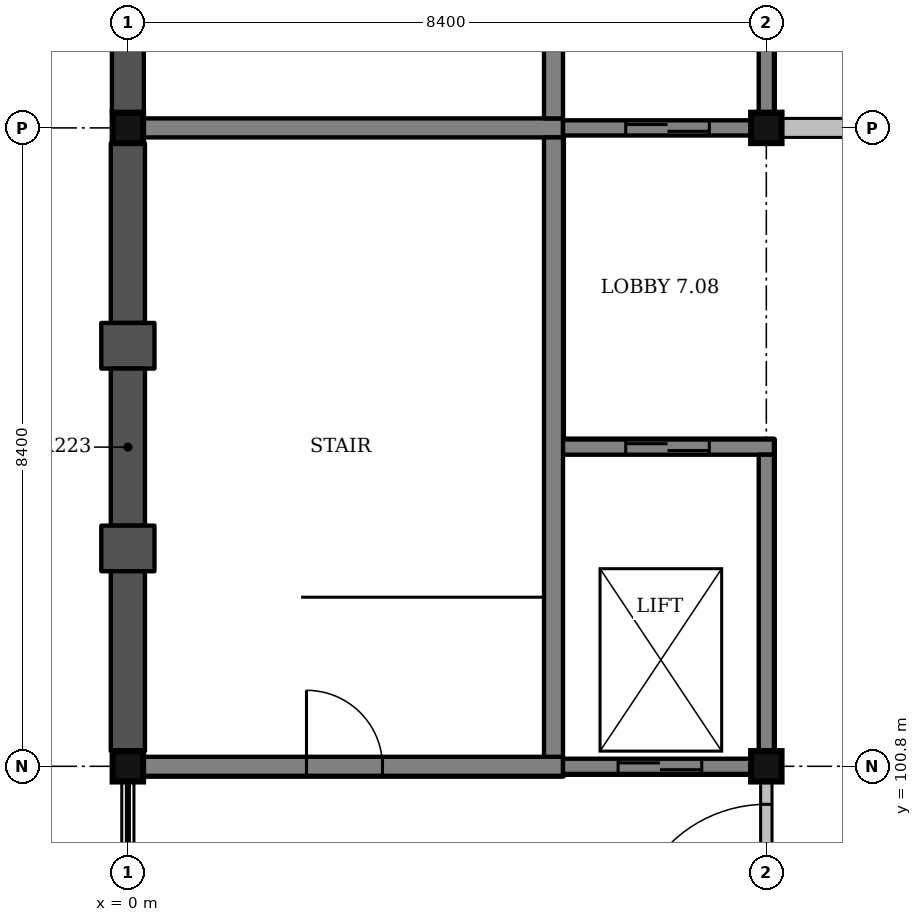
"""IFC4 building model, lengths in metres.
Left out: names, types, materials, properties, quantities, classifications, styles, units other than length and angle.
Written with IfcOpenShell. Run it as: python <this file> out.ifc"""

import sys

from ifc_helpers import new_model, si_unit, direction, frame, frame_2d, origin, origin_2d, place, context, subcontext, project, spatial, rectangle, extrude, element, fill, save


model = new_model("IFC4")
c1 = context("Model", 3, precision=1e-05, world=origin(), true_north=direction((0.0, 1.0)))
c2 = subcontext(c1, "Body", "Model", "MODEL_VIEW")
j1 = project(units=[si_unit("LENGTHUNIT", "METRE"), si_unit("PLANEANGLEUNIT", "RADIAN")], contexts=[c1])
p1 = place(None, origin())
s1 = spatial("IfcSite", under=j1, at=p1, CompositionType="ELEMENT")
p2 = place(p1, origin())
s2 = spatial("IfcBuilding", under=s1, at=p2, CompositionType="ELEMENT")
p3 = place(p2, frame((0.0, 0.0, 31.5)))
s3 = spatial("IfcBuildingStorey", under=s2, at=p3, CompositionType="ELEMENT", Elevation=31.5)
for number, where, z_axis, x_axis in (
    (1, (0.0, 100.8, 0.0), (0.0, 0.0, 1.0), (1.0, 0.0, 0.0)),
    (2, (0.0, 109.2, 0.0), (0.0, 0.0, 1.0), (1.0, 0.0, 0.0)),
    (3, (8.4, 100.8, 0.0), (0.0, 0.0, 1.0), (1.0, 0.0, 0.0)),
    (4, (8.4, 109.2, 0.0), (0.0, 0.0, 1.0), (1.0, 0.0, 0.0)),
):
    element("IfcColumn", number, at=place(p3, frame(where, z_axis=z_axis, x_axis=x_axis)), inside=s3, PredefinedType="COLUMN", context=c2, shape_type="SweptSolid", body=[
        extrude(rectangle(XDim=0.4, YDim=0.4, at=origin_2d()), origin(), (0.0, 0.0, 1.0), 4.5),
    ])
p4 = place(p3, frame((5.5, 105.0, 0.0), z_axis=(0.0, 0.0, 1.0), x_axis=(1.0, 0.0, 0.0)))
e5 = element("IfcWall", 5, at=p4, inside=s3, PredefinedType="SHEAR", context=c2, shape_type="SweptSolid", body=[
    extrude(rectangle(XDim=3.0, YDim=0.2, at=frame_2d((1.5, 0.0))), origin(), (0.0, 0.0, 1.0), 4.5),
])
p5 = place(p4, frame((1.05, 0.0, 0.0)))
e6 = element("IfcOpeningElement", 6, at=p5, cuts=e5, PredefinedType="OPENING", context=c2, shape_type="SweptSolid", body=[
    extrude(rectangle(XDim=1.1, YDim=2.1, at=frame_2d((0.55, 1.05))), frame((0.0, 0.11, 0.0), z_axis=(0.0, -1.0, 0.0), x_axis=(1.0, 0.0, 0.0)), (0.0, 0.0, 1.0), 0.22),
])
p6 = place(p3, frame((8.4, 101.0, 0.0), z_axis=(0.0, 0.0, 1.0), x_axis=(0.0, 1.0, 0.0)))
e7 = element("IfcWall", 7, at=p6, inside=s3, PredefinedType="SHEAR", context=c2, shape_type="SweptSolid", body=[
    extrude(rectangle(XDim=3.9, YDim=0.2, at=frame_2d((1.95, 0.0))), origin(), (0.0, 0.0, 1.0), 4.5),
])
p7 = place(p3, frame((8.4, 109.4, 0.0), z_axis=(0.0, 0.0, 1.0), x_axis=(0.0, 1.0, 0.0)))
e8 = element("IfcWall", 8, at=p7, inside=s3, PredefinedType="SHEAR", context=c2, shape_type="SweptSolid", body=[
    extrude(rectangle(XDim=3.9, YDim=0.2, at=frame_2d((1.95, 0.0))), origin(), (0.0, 0.0, 1.0), 4.5),
])
p8 = place(p3, frame((0.2, 100.8, 0.0), z_axis=(0.0, 0.0, 1.0), x_axis=(1.0, 0.0, 0.0)))
e9 = element("IfcWall", 9, at=p8, inside=s3, PredefinedType="SHEAR", context=c2, shape_type="SweptSolid", body=[
    extrude(rectangle(XDim=5.525, YDim=0.25, at=frame_2d((2.763, 0.0))), origin(), (0.0, 0.0, 1.0), 4.2),
])
p9 = place(p8, frame((2.15, 0.0, 0.0)))
e10 = element("IfcOpeningElement", 10, at=p9, cuts=e9, PredefinedType="OPENING", context=c2, shape_type="SweptSolid", body=[
    extrude(rectangle(XDim=1.0, YDim=2.1, at=frame_2d((0.5, 1.05))), frame((0.0, 0.135, 0.0), z_axis=(0.0, -1.0, 0.0), x_axis=(1.0, 0.0, 0.0)), (0.0, 0.0, 1.0), 0.27),
])
p10 = place(p3, frame((0.2, 109.2, 0.0), z_axis=(0.0, 0.0, 1.0), x_axis=(1.0, 0.0, 0.0)))
e11 = element("IfcWall", 11, at=p10, inside=s3, PredefinedType="SHEAR", context=c2, shape_type="SweptSolid", body=[
    extrude(rectangle(XDim=5.525, YDim=0.25, at=frame_2d((2.763, 0.0))), origin(), (0.0, 0.0, 1.0), 4.2),
])
p11 = place(p3, frame((5.6, 100.925, 0.0), z_axis=(0.0, 0.0, 1.0), x_axis=(0.0, 1.0, 0.0)))
e12 = element("IfcWall", 12, at=p11, inside=s3, PredefinedType="SHEAR", context=c2, shape_type="SweptSolid", body=[
    extrude(rectangle(XDim=8.15, YDim=0.25, at=frame_2d((4.075, 0.0))), origin(), (0.0, 0.0, 1.0), 4.2),
])
p12 = place(p3, frame((5.6, 109.325, 0.0), z_axis=(0.0, 0.0, 1.0), x_axis=(0.0, 1.0, 0.0)))
e13 = element("IfcWall", 13, at=p12, inside=s3, PredefinedType="SHEAR", context=c2, shape_type="SweptSolid", body=[
    extrude(rectangle(XDim=8.15, YDim=0.25, at=frame_2d((4.075, 0.0))), origin(), (0.0, 0.0, 1.0), 4.2),
])
p13 = place(p3, frame((0.0, 109.0, 0.0), z_axis=(0.0, 0.0, 1.0), x_axis=(0.0, -1.0, 0.0)))
e14 = element("IfcWall", 14, at=p13, inside=s3, PredefinedType="SOLIDWALL", context=c2, shape_type="SweptSolid", body=[
    extrude(rectangle(XDim=2.367, YDim=0.45, at=frame_2d((1.183, 0.0))), origin(), (0.0, 0.0, 1.0), 4.2),
])
p14 = place(p3, frame((0.0, 106.633, 0.0), z_axis=(0.0, 0.0, 1.0), x_axis=(0.0, -1.0, 0.0)))
e15 = element("IfcWall", 15, at=p14, inside=s3, PredefinedType="SOLIDWALL", context=c2, shape_type="SweptSolid", body=[
    extrude(rectangle(XDim=0.6, YDim=0.7, at=frame_2d((0.3, 0.0))), origin(), (0.0, 0.0, 1.0), 4.2),
])
p15 = place(p3, frame((0.0, 106.033, 0.0), z_axis=(0.0, 0.0, 1.0), x_axis=(0.0, -1.0, 0.0)))
e16 = element("IfcWall", 16, at=p15, inside=s3, PredefinedType="SOLIDWALL", context=c2, shape_type="SweptSolid", body=[
    extrude(rectangle(XDim=2.066, YDim=0.45, at=frame_2d((1.033, 0.0))), origin(), (0.0, 0.0, 1.0), 4.2),
])
p16 = place(p3, frame((0.0, 103.967, 0.0), z_axis=(0.0, 0.0, 1.0), x_axis=(0.0, -1.0, 0.0)))
e17 = element("IfcWall", 17, at=p16, inside=s3, PredefinedType="SOLIDWALL", context=c2, shape_type="SweptSolid", body=[
    extrude(rectangle(XDim=0.6, YDim=0.7, at=frame_2d((0.3, 0.0))), origin(), (0.0, 0.0, 1.0), 4.2),
])
p17 = place(p3, frame((0.0, 103.367, 0.0), z_axis=(0.0, 0.0, 1.0), x_axis=(0.0, -1.0, 0.0)))
e18 = element("IfcWall", 18, at=p17, inside=s3, PredefinedType="SOLIDWALL", context=c2, shape_type="SweptSolid", body=[
    extrude(rectangle(XDim=2.367, YDim=0.45, at=frame_2d((1.183, 0.0))), origin(), (0.0, 0.0, 1.0), 4.2),
])
p18 = place(p3, frame((0.0, 113.1, 0.0), z_axis=(0.0, 0.0, 1.0), x_axis=(0.0, -1.0, 0.0)))
e19 = element("IfcWall", 19, at=p18, inside=s3, PredefinedType="SOLIDWALL", context=c2, shape_type="SweptSolid", body=[
    extrude(rectangle(XDim=3.7, YDim=0.42, at=frame_2d((1.85, 0.0))), origin(), (0.0, 0.0, 1.0), 4.2),
])
p19 = place(p3, frame((8.6, 109.2, 0.0), z_axis=(0.0, 0.0, 1.0), x_axis=(1.0, 0.0, 0.0)))
e20 = element("IfcWall", 20, at=p19, inside=s3, PredefinedType="SOLIDWALL", context=c2, shape_type="SweptSolid", body=[
    extrude(rectangle(XDim=8.0, YDim=0.25, at=frame_2d((4.0, 0.0))), origin(), (0.0, 0.0, 1.0), 4.15),
])
p20 = place(p3, frame((8.4, 92.6, 0.0), z_axis=(0.0, 0.0, 1.0), x_axis=(0.0, 1.0, 0.0)))
e21 = element("IfcWall", 21, at=p20, inside=s3, PredefinedType="PARTITIONING", context=c2, shape_type="SweptSolid", body=[
    extrude(rectangle(XDim=8.0, YDim=0.15, at=frame_2d((4.0, 0.0))), origin(), (0.0, 0.0, 1.0), 3.6),
])
p21 = place(p20, frame((5.9, 0.0, 0.0)))
e22 = element("IfcOpeningElement", 22, at=p21, cuts=e21, PredefinedType="OPENING", context=c2, shape_type="SweptSolid", body=[
    extrude(rectangle(XDim=1.8, YDim=2.1, at=frame_2d((0.9, 1.05))), frame((0.0, 0.085, 0.0), z_axis=(0.0, -1.0, 0.0), x_axis=(1.0, 0.0, 0.0)), (0.0, 0.0, 1.0), 0.17),
])
p22 = place(p3, frame((5.725, 100.8, 0.0), z_axis=(0.0, 0.0, 1.0), x_axis=(1.0, 0.0, 0.0)))
e23 = element("IfcWall", 23, at=p22, inside=s3, PredefinedType="SHEAR", context=c2, shape_type="SweptSolid", body=[
    extrude(rectangle(XDim=2.475, YDim=0.2, at=frame_2d((1.237, 0.0))), origin(), (0.0, 0.0, 1.0), 4.5),
])
p23 = place(p22, frame((0.725, 0.0, 0.0)))
e24 = element("IfcOpeningElement", 24, at=p23, cuts=e23, PredefinedType="OPENING", context=c2, shape_type="SweptSolid", body=[
    extrude(rectangle(XDim=1.1, YDim=2.1, at=frame_2d((0.55, 1.05))), frame((0.0, 0.11, 0.0), z_axis=(0.0, -1.0, 0.0), x_axis=(1.0, 0.0, 0.0)), (0.0, 0.0, 1.0), 0.22),
])
p24 = place(p3, frame((5.725, 109.2, 0.0), z_axis=(0.0, 0.0, 1.0), x_axis=(1.0, 0.0, 0.0)))
e25 = element("IfcWall", 25, at=p24, inside=s3, PredefinedType="SHEAR", context=c2, shape_type="SweptSolid", body=[
    extrude(rectangle(XDim=2.475, YDim=0.2, at=frame_2d((1.237, 0.0))), origin(), (0.0, 0.0, 1.0), 4.5),
])
p25 = place(p24, frame((0.825, 0.0, 0.0)))
e26 = element("IfcOpeningElement", 26, at=p25, cuts=e25, PredefinedType="OPENING", context=c2, shape_type="SweptSolid", body=[
    extrude(rectangle(XDim=1.1, YDim=2.1, at=frame_2d((0.55, 1.05))), frame((0.0, 0.11, 0.0), z_axis=(0.0, -1.0, 0.0), x_axis=(1.0, 0.0, 0.0)), (0.0, 0.0, 1.0), 0.22),
])
p26 = place(p21, origin())
e27 = element("IfcDoor", 27, at=p26, inside=s3, OperationType="DOUBLE_DOOR_SINGLE_SWING", PredefinedType="DOOR", context=c2, shape_type="SweptSolid", body=[
    extrude(rectangle(XDim=1.8, YDim=2.1, at=frame_2d((0.9, 1.05))), frame((0.0, 0.025, 0.0), z_axis=(0.0, -1.0, 0.0), x_axis=(1.0, 0.0, 0.0)), (0.0, 0.0, 1.0), 0.05),
])
fill(e22, e27)
p27 = place(p9, origin())
e28 = element("IfcDoor", 28, at=p27, inside=s3, OperationType="SINGLE_SWING_LEFT", PredefinedType="DOOR", context=c2, shape_type="SweptSolid", body=[
    extrude(rectangle(XDim=1.0, YDim=2.1, at=frame_2d((0.5, 1.05))), frame((0.0, 0.025, 0.0), z_axis=(0.0, -1.0, 0.0), x_axis=(1.0, 0.0, 0.0)), (0.0, 0.0, 1.0), 0.05),
])
fill(e10, e28)
p28 = place(p23, origin())
e29 = element("IfcDoor", 29, at=p28, inside=s3, OperationType="SLIDING_TO_LEFT", PredefinedType="DOOR", context=c2, shape_type="SweptSolid", body=[
    extrude(rectangle(XDim=1.1, YDim=2.1, at=frame_2d((0.55, 1.05))), frame((0.0, 0.025, 0.0), z_axis=(0.0, -1.0, 0.0), x_axis=(1.0, 0.0, 0.0)), (0.0, 0.0, 1.0), 0.05),
])
fill(e24, e29)
p29 = place(p5, origin())
e30 = element("IfcDoor", 30, at=p29, inside=s3, OperationType="SLIDING_TO_RIGHT", PredefinedType="DOOR", context=c2, shape_type="SweptSolid", body=[
    extrude(rectangle(XDim=1.1, YDim=2.1, at=frame_2d((0.55, 1.05))), frame((0.0, 0.025, 0.0), z_axis=(0.0, -1.0, 0.0), x_axis=(1.0, 0.0, 0.0)), (0.0, 0.0, 1.0), 0.05),
])
fill(e6, e30)
p30 = place(p25, origin())
e31 = element("IfcDoor", 31, at=p30, inside=s3, OperationType="SLIDING_TO_LEFT", PredefinedType="DOOR", context=c2, shape_type="SweptSolid", body=[
    extrude(rectangle(XDim=1.1, YDim=2.1, at=frame_2d((0.55, 1.05))), frame((0.0, 0.025, 0.0), z_axis=(0.0, -1.0, 0.0), x_axis=(1.0, 0.0, 0.0)), (0.0, 0.0, 1.0), 0.05),
])
fill(e26, e31)
p31 = place(p2, frame((0.0, 0.0, 36.0)))
p32 = place(p31, frame((0.0, 0.0, 1.3)))
p33 = place(p32, frame((7.0, 102.9, 0.0)))
p34 = place(p33, frame((0.0, 0.0, 0.15)))
e32 = element("IfcWindow", 32, at=p34, inside=s3, PartitioningType="SINGLE_PANEL", PredefinedType="SKYLIGHT", context=c2, shape_type="SweptSolid", body=[
    extrude(rectangle(XDim=0.9, YDim=1.2, at=origin_2d()), origin(), (0.0, 0.0, 1.0), 0.05),
])
save(model, sys.argv[1])
